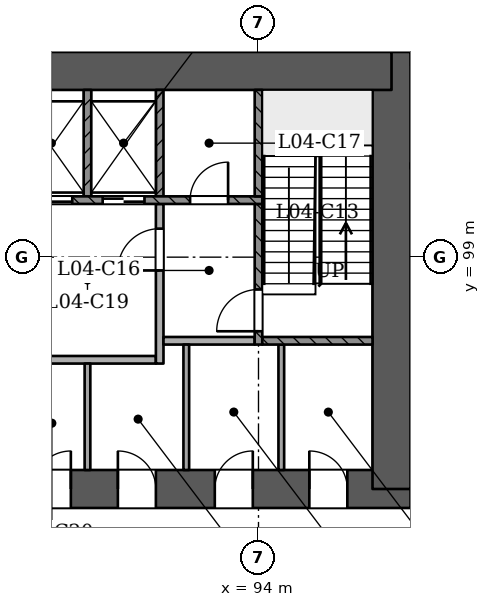
"""IFC4 building model, lengths in metres.
Left out: names, types, materials, properties, quantities, classifications, styles, units other than length and angle.
Written with IfcOpenShell. Run it as: python <this file> out.ifc"""

import sys

from ifc_helpers import new_model, si_unit, direction, frame, frame_2d, origin, place, context, subcontext, project, spatial, rectangle, extrude, element, fill, save


model = new_model("IFC4")
c1 = context("Model", 3, precision=1e-05, world=origin(), true_north=direction((0.0, 1.0)))
c2 = subcontext(c1, "Body", "Model", "MODEL_VIEW")
j1 = project(units=[si_unit("LENGTHUNIT", "METRE"), si_unit("PLANEANGLEUNIT", "RADIAN")], contexts=[c1])
p1 = place(None, origin())
s1 = spatial("IfcSite", under=j1, at=p1, CompositionType="ELEMENT")
p2 = place(p1, origin())
s2 = spatial("IfcBuilding", under=s1, at=p2, CompositionType="ELEMENT")
p3 = place(p2, frame((0.0, 0.0, 22.5)))
s3 = spatial("IfcBuildingStorey", under=s2, at=p3, CompositionType="ELEMENT", Elevation=22.5)
p4 = place(p3, frame((72.5, 92.9, 0.0), z_axis=(0.0, 0.0, 1.0), x_axis=(1.0, 0.0, 0.0)))
e1 = element("IfcWall", 1, at=p4, inside=s3, PredefinedType="SHEAR", context=c2, shape_type="SweptSolid", body=[
    extrude(rectangle(XDim=25.5, YDim=1.0, at=frame_2d((12.75, 0.0))), origin(), (0.0, 0.0, 1.0), 4.5),
])
p5 = place(p4, frame((1.3, 0.0, 0.0)))
e2 = element("IfcOpeningElement", 2, at=p5, cuts=e1, PredefinedType="OPENING", context=c2, shape_type="SweptSolid", body=[
    extrude(rectangle(XDim=1.2, YDim=2.1, at=frame_2d((0.6, 1.05))), frame((0.0, 0.51, 0.0), z_axis=(0.0, -1.0, 0.0), x_axis=(1.0, 0.0, 0.0)), (0.0, 0.0, 1.0), 1.021),
])
p6 = place(p4, frame((3.5, 0.0, 0.0)))
e3 = element("IfcOpeningElement", 3, at=p6, cuts=e1, PredefinedType="OPENING", context=c2, shape_type="SweptSolid", body=[
    extrude(rectangle(XDim=1.2, YDim=2.1, at=frame_2d((0.6, 1.05))), frame((0.0, 0.51, 0.0), z_axis=(0.0, -1.0, 0.0), x_axis=(1.0, 0.0, 0.0)), (0.0, 0.0, 1.0), 1.021),
])
p7 = place(p4, frame((13.5, 0.0, 0.0)))
e4 = element("IfcOpeningElement", 4, at=p7, cuts=e1, PredefinedType="OPENING", context=c2, shape_type="SweptSolid", body=[
    extrude(rectangle(XDim=1.2, YDim=2.1, at=frame_2d((0.6, 1.05))), frame((0.0, 0.51, 0.0), z_axis=(0.0, -1.0, 0.0), x_axis=(1.0, 0.0, 0.0)), (0.0, 0.0, 1.0), 1.021),
])
p8 = place(p4, frame((15.562, 0.0, 0.0)))
e5 = element("IfcOpeningElement", 5, at=p8, cuts=e1, PredefinedType="OPENING", context=c2, shape_type="SweptSolid", body=[
    extrude(rectangle(XDim=1.0, YDim=2.1, at=frame_2d((0.5, 1.05))), frame((0.0, 0.51, 0.0), z_axis=(0.0, -1.0, 0.0), x_axis=(1.0, 0.0, 0.0)), (0.0, 0.0, 1.0), 1.021),
])
p9 = place(p4, frame((17.8, 0.0, 0.0)))
e6 = element("IfcOpeningElement", 6, at=p9, cuts=e1, PredefinedType="OPENING", context=c2, shape_type="SweptSolid", body=[
    extrude(rectangle(XDim=1.0, YDim=2.1, at=frame_2d((0.5, 1.05))), frame((0.0, 0.51, 0.0), z_axis=(0.0, -1.0, 0.0), x_axis=(1.0, 0.0, 0.0)), (0.0, 0.0, 1.0), 1.021),
])
p10 = place(p4, frame((20.35, 0.0, 0.0)))
e7 = element("IfcOpeningElement", 7, at=p10, cuts=e1, PredefinedType="OPENING", context=c2, shape_type="SweptSolid", body=[
    extrude(rectangle(XDim=1.0, YDim=2.1, at=frame_2d((0.5, 1.05))), frame((0.0, 0.51, 0.0), z_axis=(0.0, -1.0, 0.0), x_axis=(1.0, 0.0, 0.0)), (0.0, 0.0, 1.0), 1.021),
])
p11 = place(p4, frame((22.837, 0.0, 0.0)))
e8 = element("IfcOpeningElement", 8, at=p11, cuts=e1, PredefinedType="OPENING", context=c2, shape_type="SweptSolid", body=[
    extrude(rectangle(XDim=1.0, YDim=2.1, at=frame_2d((0.5, 1.05))), frame((0.0, 0.51, 0.0), z_axis=(0.0, -1.0, 0.0), x_axis=(1.0, 0.0, 0.0)), (0.0, 0.0, 1.0), 1.021),
])
p12 = place(p3, frame((97.5, 92.9, 0.0), z_axis=(0.0, 0.0, 1.0), x_axis=(0.0, 1.0, 0.0)))
e9 = element("IfcWall", 9, at=p12, inside=s3, PredefinedType="SHEAR", context=c2, shape_type="SweptSolid", body=[
    extrude(rectangle(XDim=11.5, YDim=1.0, at=frame_2d((5.75, 0.0))), origin(), (0.0, 0.0, 1.0), 4.5),
])
p13 = place(p3, frame((97.5, 103.9, 0.0), z_axis=(0.0, 0.0, 1.0), x_axis=(-1.0, 0.0, 0.0)))
e10 = element("IfcWall", 10, at=p13, inside=s3, PredefinedType="SHEAR", context=c2, shape_type="SweptSolid", body=[
    extrude(rectangle(XDim=25.5, YDim=1.0, at=frame_2d((12.75, 0.0))), origin(), (0.0, 0.0, 1.0), 4.5),
])
p14 = place(p3, frame((86.407, 57.091, 0.0), z_axis=(0.0, 0.0, 1.0), x_axis=(0.49999953585, 0.866025671762, 0.0)))
e11 = element("IfcWall", 11, at=p14, inside=s3, PredefinedType="PARTITIONING", context=c2, shape_type="SweptSolid", body=[
    extrude(rectangle(XDim=45.0, YDim=0.15, at=frame_2d((22.5, 0.0))), origin(), (0.0, 0.0, 1.0), 3.6),
])
p15 = place(p14, frame((6.15, 0.0, 0.0)))
e12 = element("IfcOpeningElement", 12, at=p15, cuts=e11, PredefinedType="OPENING", context=c2, shape_type="SweptSolid", body=[
    extrude(rectangle(XDim=1.2, YDim=2.1, at=frame_2d((0.6, 1.05))), frame((0.0, 0.085, 0.0), z_axis=(0.0, -1.0, 0.0), x_axis=(1.0, 0.0, 0.0)), (0.0, 0.0, 1.0), 0.171),
])
p16 = place(p14, frame((16.3, 0.0, 0.0)))
e13 = element("IfcOpeningElement", 13, at=p16, cuts=e11, PredefinedType="OPENING", context=c2, shape_type="SweptSolid", body=[
    extrude(rectangle(XDim=1.2, YDim=2.1, at=frame_2d((0.6, 1.05))), frame((0.0, 0.085, 0.0), z_axis=(0.0, -1.0, 0.0), x_axis=(1.0, 0.0, 0.0)), (0.0, 0.0, 1.0), 0.171),
])
p17 = place(p14, frame((24.25, 0.0, 0.0)))
e14 = element("IfcOpeningElement", 14, at=p17, cuts=e11, PredefinedType="OPENING", context=c2, shape_type="SweptSolid", body=[
    extrude(rectangle(XDim=1.0, YDim=2.1, at=frame_2d((0.5, 1.05))), frame((0.0, 0.085, 0.0), z_axis=(0.0, -1.0, 0.0), x_axis=(1.0, 0.0, 0.0)), (0.0, 0.0, 1.0), 0.171),
])
p18 = place(p14, frame((30.9, 0.0, 0.0)))
e15 = element("IfcOpeningElement", 15, at=p18, cuts=e11, PredefinedType="OPENING", context=c2, shape_type="SweptSolid", body=[
    extrude(rectangle(XDim=1.2, YDim=2.1, at=frame_2d((0.6, 1.05))), frame((0.0, 0.085, 0.0), z_axis=(0.0, -1.0, 0.0), x_axis=(1.0, 0.0, 0.0)), (0.0, 0.0, 1.0), 0.171),
])
p19 = place(p14, frame((36.761, 0.0, 0.0)))
e16 = element("IfcOpeningElement", 16, at=p19, cuts=e11, PredefinedType="OPENING", context=c2, shape_type="SweptSolid", body=[
    extrude(rectangle(XDim=1.0, YDim=2.1, at=frame_2d((0.5, 1.05))), frame((0.0, 0.085, 0.0), z_axis=(0.0, -1.0, 0.0), x_axis=(1.0, 0.0, 0.0)), (0.0, 0.0, 1.0), 0.171),
])
p20 = place(p14, frame((39.011, 0.0, 0.0)))
e17 = element("IfcOpeningElement", 17, at=p20, cuts=e11, PredefinedType="OPENING", context=c2, shape_type="SweptSolid", body=[
    extrude(rectangle(XDim=1.0, YDim=2.1, at=frame_2d((0.5, 1.05))), frame((0.0, 0.085, 0.0), z_axis=(0.0, -1.0, 0.0), x_axis=(1.0, 0.0, 0.0)), (0.0, 0.0, 1.0), 0.171),
])
p21 = place(p14, frame((42.25, 0.0, 0.0)))
e18 = element("IfcOpeningElement", 18, at=p21, cuts=e11, PredefinedType="OPENING", context=c2, shape_type="SweptSolid", body=[
    extrude(rectangle(XDim=1.0, YDim=2.1, at=frame_2d((0.5, 1.05))), frame((0.0, 0.085, 0.0), z_axis=(0.0, -1.0, 0.0), x_axis=(1.0, 0.0, 0.0)), (0.0, 0.0, 1.0), 0.171),
])
p22 = place(p3, frame((99.726, 101.4, 0.0), z_axis=(0.0, 0.0, 1.0), x_axis=(-0.999999909973, 0.000424328109, 0.0)))
e19 = element("IfcWall", 19, at=p22, inside=s3, PredefinedType="PARTITIONING", context=c2, shape_type="SweptSolid", body=[
    extrude(rectangle(XDim=1.726, YDim=0.15, at=frame_2d((0.863, 0.0))), origin(), (0.0, 0.0, 1.0), 4.0),
])
p23 = place(p3, frame((89.5, 93.4, 0.0), z_axis=(0.0, 0.0, 1.0), x_axis=(0.0, 1.0, 0.0)))
e20 = element("IfcWall", 20, at=p23, inside=s3, PredefinedType="PARTITIONING", context=c2, shape_type="SweptSolid", body=[
    extrude(rectangle(XDim=2.8, YDim=0.15, at=frame_2d((1.4, 0.0))), origin(), (0.0, 0.0, 1.0), 4.0),
])
for number, where, z_axis, x_axis in (
    (21, (92.1, 93.4, 0.0), (0.0, 0.0, 1.0), (0.0, 1.0, 0.0)),
    (22, (94.6, 93.4, 0.0), (0.0, 0.0, 1.0), (0.0, 1.0, 0.0)),
):
    element("IfcWall", number, at=place(p3, frame(where, z_axis=z_axis, x_axis=x_axis)), inside=s3, PredefinedType="PARTITIONING", context=c2, shape_type="SweptSolid", body=[
        extrude(rectangle(XDim=3.3, YDim=0.15, at=frame_2d((1.65, 0.0))), origin(), (0.0, 0.0, 1.0), 4.0),
    ])
p24 = place(p3, frame((87.7, 96.3, 0.0), z_axis=(0.0, 0.0, 1.0), x_axis=(1.0, 0.0, 0.0)))
e23 = element("IfcWall", 23, at=p24, inside=s3, PredefinedType="PARTITIONING", context=c2, shape_type="SweptSolid", body=[
    extrude(rectangle(XDim=3.6, YDim=0.2, at=frame_2d((1.8, 0.0))), origin(), (0.0, 0.0, 1.0), 4.0),
])
p25 = place(p3, frame((91.4, 96.2, 0.0), z_axis=(0.0, 0.0, 1.0), x_axis=(0.0, 1.0, 0.0)))
e24 = element("IfcWall", 24, at=p25, inside=s3, PredefinedType="PARTITIONING", context=c2, shape_type="SweptSolid", body=[
    extrude(rectangle(XDim=4.2, YDim=0.2, at=frame_2d((2.1, 0.0))), origin(), (0.0, 0.0, 1.0), 4.0),
])
p26 = place(p25, frame((2.45, 0.0, 0.0)))
e25 = element("IfcOpeningElement", 25, at=p26, cuts=e24, PredefinedType="OPENING", context=c2, shape_type="SweptSolid", body=[
    extrude(rectangle(XDim=1.1, YDim=2.1, at=frame_2d((0.55, 1.05))), frame((0.0, 0.11, 0.0), z_axis=(0.0, -1.0, 0.0), x_axis=(1.0, 0.0, 0.0)), (0.0, 0.0, 1.0), 0.221),
])
p27 = place(p3, frame((91.5, 96.8, 0.0), z_axis=(0.0, 0.0, 1.0), x_axis=(1.0, 0.0, 0.0)))
e26 = element("IfcWall", 26, at=p27, inside=s3, PredefinedType="PARTITIONING", context=c2, shape_type="SweptSolid", body=[
    extrude(rectangle(XDim=2.4, YDim=0.2, at=frame_2d((1.2, 0.0))), origin(), (0.0, 0.0, 1.0), 4.0),
])
p28 = place(p3, frame((94.0, 96.7, 0.0), z_axis=(0.0, 0.0, 1.0), x_axis=(0.0, 1.0, 0.0)))
e27 = element("IfcWall", 27, at=p28, inside=s3, PredefinedType="SOLIDWALL", context=c2, shape_type="SweptSolid", body=[
    extrude(rectangle(XDim=3.7, YDim=0.2, at=frame_2d((1.85, 0.0))), origin(), (0.0, 0.0, 1.0), 4.0),
])
p29 = place(p28, frame((0.35, 0.0, 0.0)))
e28 = element("IfcOpeningElement", 28, at=p29, cuts=e27, PredefinedType="OPENING", context=c2, shape_type="SweptSolid", body=[
    extrude(rectangle(XDim=1.1, YDim=2.1, at=frame_2d((0.55, 1.05))), frame((0.0, 0.11, 0.0), z_axis=(0.0, -1.0, 0.0), x_axis=(1.0, 0.0, 0.0)), (0.0, 0.0, 1.0), 0.221),
])
p30 = place(p3, frame((94.1, 96.8, 0.0), z_axis=(0.0, 0.0, 1.0), x_axis=(1.0, 0.0, 0.0)))
e29 = element("IfcWall", 29, at=p30, inside=s3, PredefinedType="SOLIDWALL", context=c2, shape_type="SweptSolid", body=[
    extrude(rectangle(XDim=2.9, YDim=0.2, at=frame_2d((1.45, 0.0))), origin(), (0.0, 0.0, 1.0), 4.0),
])
p31 = place(p3, frame((75.9, 100.5, 0.0), z_axis=(0.0, 0.0, 1.0), x_axis=(1.0, 0.0, 0.0)))
e30 = element("IfcWall", 30, at=p31, inside=s3, PredefinedType="SOLIDWALL", context=c2, shape_type="SweptSolid", body=[
    extrude(rectangle(XDim=18.2, YDim=0.2, at=frame_2d((9.1, 0.0))), origin(), (0.0, 0.0, 1.0), 4.0),
])
p32 = place(p31, frame((2.6, 0.0, 0.0)))
e31 = element("IfcOpeningElement", 31, at=p32, cuts=e30, PredefinedType="OPENING", context=c2, shape_type="SweptSolid", body=[
    extrude(rectangle(XDim=1.1, YDim=2.1, at=frame_2d((0.55, 1.05))), frame((0.0, 0.11, 0.0), z_axis=(0.0, -1.0, 0.0), x_axis=(1.0, 0.0, 0.0)), (0.0, 0.0, 1.0), 0.221),
])
p33 = place(p31, frame((4.5, 0.0, 0.0)))
e32 = element("IfcOpeningElement", 32, at=p33, cuts=e30, PredefinedType="OPENING", context=c2, shape_type="SweptSolid", body=[
    extrude(rectangle(XDim=1.1, YDim=2.1, at=frame_2d((0.55, 1.05))), frame((0.0, 0.11, 0.0), z_axis=(0.0, -1.0, 0.0), x_axis=(1.0, 0.0, 0.0)), (0.0, 0.0, 1.0), 0.221),
])
p34 = place(p31, frame((6.4, 0.0, 0.0)))
e33 = element("IfcOpeningElement", 33, at=p34, cuts=e30, PredefinedType="OPENING", context=c2, shape_type="SweptSolid", body=[
    extrude(rectangle(XDim=1.1, YDim=2.1, at=frame_2d((0.55, 1.05))), frame((0.0, 0.11, 0.0), z_axis=(0.0, -1.0, 0.0), x_axis=(1.0, 0.0, 0.0)), (0.0, 0.0, 1.0), 0.221),
])
p35 = place(p31, frame((8.3, 0.0, 0.0)))
e34 = element("IfcOpeningElement", 34, at=p35, cuts=e30, PredefinedType="OPENING", context=c2, shape_type="SweptSolid", body=[
    extrude(rectangle(XDim=1.1, YDim=2.1, at=frame_2d((0.55, 1.05))), frame((0.0, 0.11, 0.0), z_axis=(0.0, -1.0, 0.0), x_axis=(1.0, 0.0, 0.0)), (0.0, 0.0, 1.0), 0.221),
])
p36 = place(p31, frame((10.2, 0.0, 0.0)))
e35 = element("IfcOpeningElement", 35, at=p36, cuts=e30, PredefinedType="OPENING", context=c2, shape_type="SweptSolid", body=[
    extrude(rectangle(XDim=1.1, YDim=2.1, at=frame_2d((0.55, 1.05))), frame((0.0, 0.11, 0.0), z_axis=(0.0, -1.0, 0.0), x_axis=(1.0, 0.0, 0.0)), (0.0, 0.0, 1.0), 0.221),
])
p37 = place(p31, frame((12.1, 0.0, 0.0)))
e36 = element("IfcOpeningElement", 36, at=p37, cuts=e30, PredefinedType="OPENING", context=c2, shape_type="SweptSolid", body=[
    extrude(rectangle(XDim=1.1, YDim=2.1, at=frame_2d((0.55, 1.05))), frame((0.0, 0.11, 0.0), z_axis=(0.0, -1.0, 0.0), x_axis=(1.0, 0.0, 0.0)), (0.0, 0.0, 1.0), 0.221),
])
p38 = place(p31, frame((14.0, 0.0, 0.0)))
e37 = element("IfcOpeningElement", 37, at=p38, cuts=e30, PredefinedType="OPENING", context=c2, shape_type="SweptSolid", body=[
    extrude(rectangle(XDim=1.1, YDim=2.1, at=frame_2d((0.55, 1.05))), frame((0.0, 0.11, 0.0), z_axis=(0.0, -1.0, 0.0), x_axis=(1.0, 0.0, 0.0)), (0.0, 0.0, 1.0), 0.221),
])
p39 = place(p31, frame((0.65, 0.0, 0.0)))
e38 = element("IfcOpeningElement", 38, at=p39, cuts=e30, PredefinedType="OPENING", context=c2, shape_type="SweptSolid", body=[
    extrude(rectangle(XDim=1.0, YDim=2.1, at=frame_2d((0.5, 1.05))), frame((0.0, 0.11, 0.0), z_axis=(0.0, -1.0, 0.0), x_axis=(1.0, 0.0, 0.0)), (0.0, 0.0, 1.0), 0.221),
])
p40 = place(p31, frame((16.3, 0.0, 0.0)))
e39 = element("IfcOpeningElement", 39, at=p40, cuts=e30, PredefinedType="OPENING", context=c2, shape_type="SweptSolid", body=[
    extrude(rectangle(XDim=1.0, YDim=2.1, at=frame_2d((0.5, 1.05))), frame((0.0, 0.11, 0.0), z_axis=(0.0, -1.0, 0.0), x_axis=(1.0, 0.0, 0.0)), (0.0, 0.0, 1.0), 0.221),
])
for number, where, z_axis, x_axis in (
    (40, (89.5, 100.6, 0.0), (0.0, 0.0, 1.0), (0.0, 1.0, 0.0)),
    (41, (91.4, 100.6, 0.0), (0.0, 0.0, 1.0), (0.0, 1.0, 0.0)),
    (42, (94.0, 100.6, 0.0), (0.0, 0.0, 1.0), (0.0, 1.0, 0.0)),
):
    element("IfcWall", number, at=place(p3, frame(where, z_axis=z_axis, x_axis=x_axis)), inside=s3, PredefinedType="SOLIDWALL", context=c2, shape_type="SweptSolid", body=[
        extrude(rectangle(XDim=2.8, YDim=0.2, at=frame_2d((1.4, 0.0))), origin(), (0.0, 0.0, 1.0), 4.0),
    ])
p41 = place(p37, origin())
e43 = element("IfcDoor", 43, at=p41, inside=s3, OperationType="SLIDING_TO_RIGHT", PredefinedType="NOTDEFINED", context=c2, shape_type="SweptSolid", body=[
    extrude(rectangle(XDim=1.1, YDim=2.1, at=frame_2d((0.55, 1.05))), frame((0.0, 0.025, 0.0), z_axis=(0.0, -1.0, 0.0), x_axis=(1.0, 0.0, 0.0)), (0.0, 0.0, 1.0), 0.05),
])
fill(e36, e43)
p42 = place(p38, origin())
e44 = element("IfcDoor", 44, at=p42, inside=s3, OperationType="SLIDING_TO_LEFT", PredefinedType="NOTDEFINED", context=c2, shape_type="SweptSolid", body=[
    extrude(rectangle(XDim=1.1, YDim=2.1, at=frame_2d((0.55, 1.05))), frame((0.0, 0.025, 0.0), z_axis=(0.0, -1.0, 0.0), x_axis=(1.0, 0.0, 0.0)), (0.0, 0.0, 1.0), 0.05),
])
fill(e37, e44)
p43 = place(p29, origin())
e45 = element("IfcDoor", 45, at=p43, inside=s3, OperationType="SINGLE_SWING_LEFT", PredefinedType="NOTDEFINED", context=c2, shape_type="SweptSolid", body=[
    extrude(rectangle(XDim=1.1, YDim=2.1, at=frame_2d((0.55, 1.05))), frame((0.0, 0.025, 0.0), z_axis=(0.0, -1.0, 0.0), x_axis=(1.0, 0.0, 0.0)), (0.0, 0.0, 1.0), 0.05),
])
fill(e28, e45)
p44 = place(p26, origin())
e46 = element("IfcDoor", 46, at=p44, inside=s3, OperationType="SINGLE_SWING_LEFT", PredefinedType="NOTDEFINED", context=c2, shape_type="SweptSolid", body=[
    extrude(rectangle(XDim=1.1, YDim=2.1, at=frame_2d((0.55, 1.05))), frame((0.0, 0.025, 0.0), z_axis=(0.0, -1.0, 0.0), x_axis=(1.0, 0.0, 0.0)), (0.0, 0.0, 1.0), 0.05),
])
fill(e25, e46)
p45 = place(p40, origin())
e47 = element("IfcDoor", 47, at=p45, inside=s3, OperationType="SINGLE_SWING_RIGHT", PredefinedType="NOTDEFINED", context=c2, shape_type="SweptSolid", body=[
    extrude(rectangle(XDim=1.0, YDim=2.1, at=frame_2d((0.5, 1.05))), frame((0.0, 0.025, 0.0), z_axis=(0.0, -1.0, 0.0), x_axis=(1.0, 0.0, 0.0)), (0.0, 0.0, 1.0), 0.05),
])
fill(e39, e47)
p46 = place(p8, origin())
e48 = element("IfcDoor", 48, at=p46, inside=s3, OperationType="SINGLE_SWING_RIGHT", PredefinedType="NOTDEFINED", context=c2, shape_type="SweptSolid", body=[
    extrude(rectangle(XDim=1.0, YDim=2.1, at=frame_2d((0.5, 1.05))), frame((0.0, 0.025, 0.0), z_axis=(0.0, -1.0, 0.0), x_axis=(1.0, 0.0, 0.0)), (0.0, 0.0, 1.0), 0.05),
])
fill(e5, e48)
p47 = place(p9, origin())
e49 = element("IfcDoor", 49, at=p47, inside=s3, OperationType="SINGLE_SWING_LEFT", PredefinedType="NOTDEFINED", context=c2, shape_type="SweptSolid", body=[
    extrude(rectangle(XDim=1.0, YDim=2.1, at=frame_2d((0.5, 1.05))), frame((0.0, 0.025, 0.0), z_axis=(0.0, -1.0, 0.0), x_axis=(1.0, 0.0, 0.0)), (0.0, 0.0, 1.0), 0.05),
])
fill(e6, e49)
p48 = place(p10, origin())
e50 = element("IfcDoor", 50, at=p48, inside=s3, OperationType="SINGLE_SWING_RIGHT", PredefinedType="NOTDEFINED", context=c2, shape_type="SweptSolid", body=[
    extrude(rectangle(XDim=1.0, YDim=2.1, at=frame_2d((0.5, 1.05))), frame((0.0, 0.025, 0.0), z_axis=(0.0, -1.0, 0.0), x_axis=(1.0, 0.0, 0.0)), (0.0, 0.0, 1.0), 0.05),
])
fill(e7, e50)
p49 = place(p11, origin())
e51 = element("IfcDoor", 51, at=p49, inside=s3, OperationType="SINGLE_SWING_LEFT", PredefinedType="NOTDEFINED", context=c2, shape_type="SweptSolid", body=[
    extrude(rectangle(XDim=1.0, YDim=2.1, at=frame_2d((0.5, 1.05))), frame((0.0, 0.025, 0.0), z_axis=(0.0, -1.0, 0.0), x_axis=(1.0, 0.0, 0.0)), (0.0, 0.0, 1.0), 0.05),
])
fill(e8, e51)
save(model, sys.argv[1])
